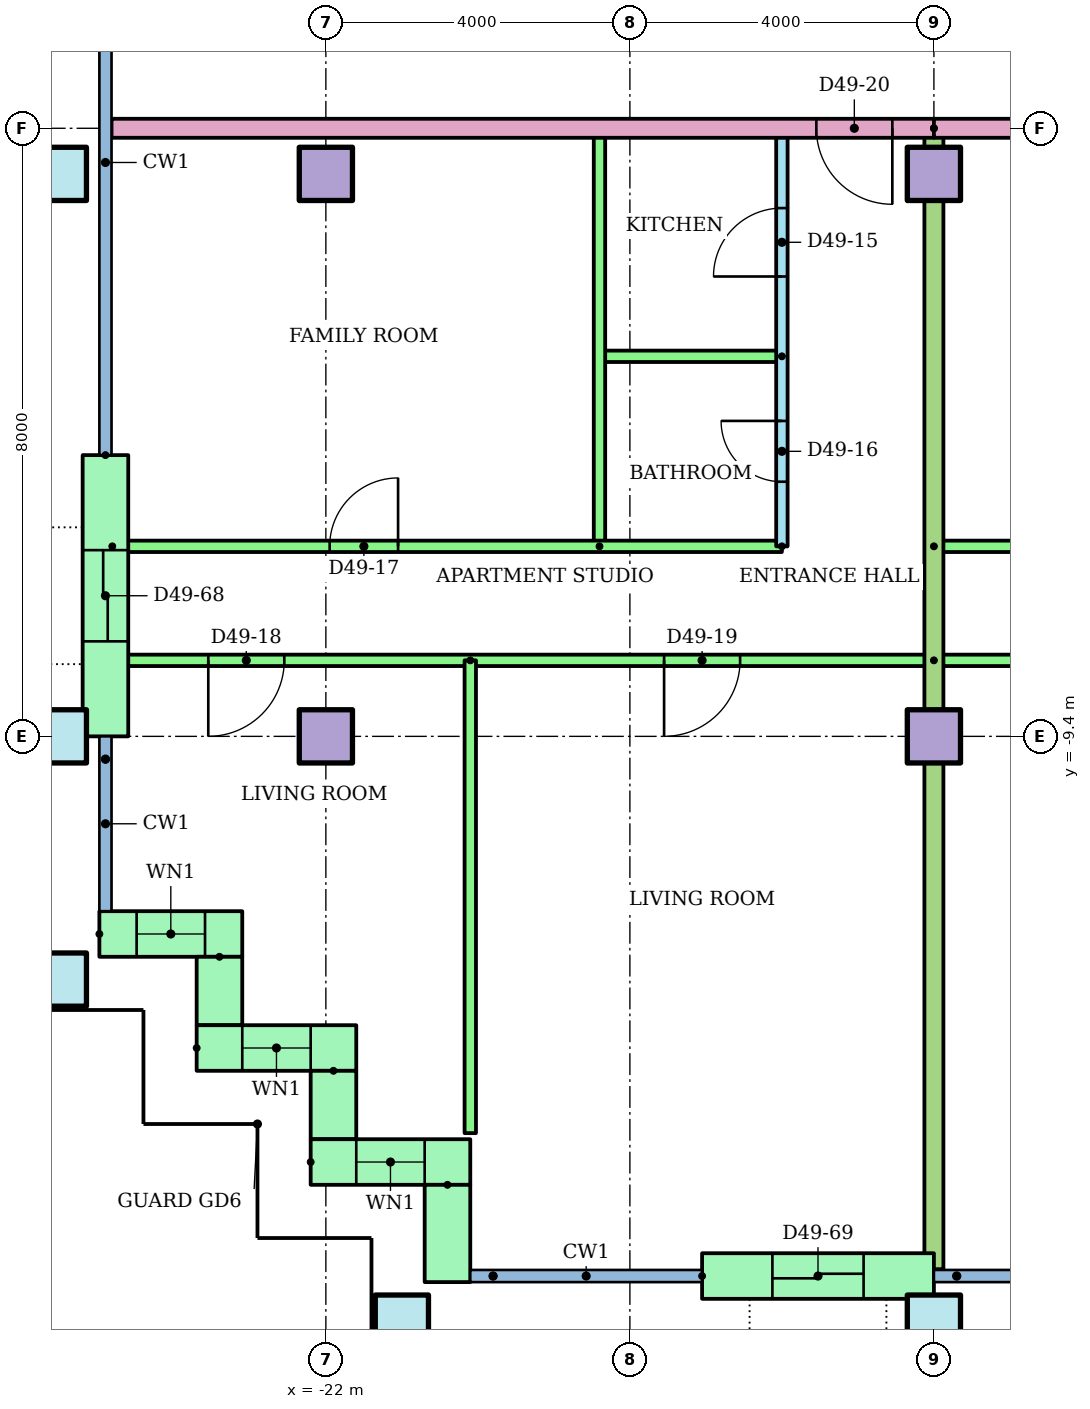
"""IFC4 building model, lengths in metres.
Left out: names, types, materials, properties, quantities, classifications, styles, units other than length and angle.
Written with IfcOpenShell. Run it as: python <this file> out.ifc"""

import sys

from ifc_helpers import new_model, si_unit, direction, frame, frame_2d, origin, origin_2d, place, context, subcontext, project, spatial, rectangle, hollow_rectangle, extrude, element, fill, save


model = new_model("IFC4")
c1 = context("Model", 3, precision=1e-05, world=origin(), true_north=direction((0.0, 1.0)))
c2 = subcontext(c1, "Body", "Model", "MODEL_VIEW")
j1 = project(units=[si_unit("LENGTHUNIT", "METRE"), si_unit("PLANEANGLEUNIT", "RADIAN")], contexts=[c1])
p1 = place(None, origin())
s1 = spatial("IfcSite", under=j1, at=p1, CompositionType="ELEMENT")
p2 = place(p1, origin())
s2 = spatial("IfcBuilding", under=s1, at=p2, CompositionType="ELEMENT")
p3 = place(p2, frame((0.0, 0.0, 187.7)))
s3 = spatial("IfcBuildingStorey", under=s2, at=p3, CompositionType="ELEMENT", Elevation=187.7)
for number, where in (
    (1, (-21.0, -17.1, 0.0)),
    (2, (-14.0, -17.1, 0.0)),
    (3, (-25.5, -12.6, 0.0)),
    (4, (-25.5, -9.4, 0.0)),
):
    element("IfcColumn", number, at=place(p3, frame(where)), inside=s3, PredefinedType="COLUMN", context=c2, shape_type="SweptSolid", body=[
        extrude(hollow_rectangle(XDim=0.7, YDim=0.7, WallThickness=0.036, at=origin_2d()), origin(), (0.0, 0.0, 1.0), 3.2),
    ])
for number, where in (
    (5, (-22.0, -9.4, 0.0)),
    (6, (-14.0, -9.4, 0.0)),
):
    element("IfcColumn", number, at=place(p3, frame(where)), inside=s3, PredefinedType="COLUMN", context=c2, shape_type="SweptSolid", body=[
        extrude(rectangle(XDim=0.7, YDim=0.7, at=origin_2d()), origin(), (0.0, 0.0, 1.0), 3.2),
    ])
p4 = place(p3, frame((-25.5, -2.0, 0.0)))
e7 = element("IfcColumn", 7, at=p4, inside=s3, PredefinedType="COLUMN", context=c2, shape_type="SweptSolid", body=[
    extrude(hollow_rectangle(XDim=0.7, YDim=0.7, WallThickness=0.036, at=origin_2d()), origin(), (0.0, 0.0, 1.0), 3.2),
])
for number, where in (
    (8, (-22.0, -2.0, 0.0)),
    (9, (-14.0, -2.0, 0.0)),
):
    element("IfcColumn", number, at=place(p3, frame(where)), inside=s3, PredefinedType="COLUMN", context=c2, shape_type="SweptSolid", body=[
        extrude(rectangle(XDim=0.7, YDim=0.7, at=origin_2d()), origin(), (0.0, 0.0, 1.0), 3.2),
    ])
p5 = place(p3, frame((-24.9, -5.7, 0.0), z_axis=(0.0, 0.0, 1.0), x_axis=(0.0, -1.0, 0.0)))
e10 = element("IfcWall", 10, at=p5, inside=s3, PredefinedType="STANDARD", context=c2, shape_type="SweptSolid", body=[
    extrude(rectangle(XDim=3.7, YDim=0.6, at=frame_2d((1.85, 0.0))), origin(), (0.0, 0.0, 1.0), 2.92),
])
p6 = place(p5, frame((1.25, 0.0, 0.0)))
e11 = element("IfcOpeningElement", 11, at=p6, cuts=e10, PredefinedType="OPENING", context=c2, shape_type="SweptSolid", body=[
    extrude(rectangle(XDim=1.2, YDim=2.1, at=frame_2d((0.6, 1.05))), frame((0.0, 0.31, 0.0), z_axis=(0.0, -1.0, 0.0), x_axis=(1.0, 0.0, 0.0)), (0.0, 0.0, 1.0), 0.62),
])
p7 = place(p3, frame((-24.98, -12.0, 0.0)))
e12 = element("IfcWall", 12, at=p7, inside=s3, PredefinedType="STANDARD", context=c2, shape_type="SweptSolid", body=[
    extrude(rectangle(XDim=1.88, YDim=0.6, at=frame_2d((0.94, 0.0))), origin(), (0.0, 0.0, 1.0), 2.92),
])
p8 = place(p7, frame((0.49, 0.0, 0.9)))
e13 = element("IfcOpeningElement", 13, at=p8, cuts=e12, PredefinedType="OPENING", context=c2, shape_type="SweptSolid", body=[
    extrude(rectangle(XDim=0.9, YDim=1.5, at=frame_2d((0.45, 0.75))), frame((0.0, 0.31, 0.0), z_axis=(0.0, -1.0, 0.0), x_axis=(1.0, 0.0, 0.0)), (0.0, 0.0, 1.0), 0.62),
])
p9 = place(p3, frame((-23.4, -12.3, 0.0), z_axis=(0.0, 0.0, 1.0), x_axis=(0.0, -1.0, 0.0)))
e14 = element("IfcWall", 14, at=p9, inside=s3, PredefinedType="STANDARD", context=c2, shape_type="SweptSolid", body=[
    extrude(rectangle(XDim=0.9, YDim=0.6, at=frame_2d((0.45, 0.0))), origin(), (0.0, 0.0, 1.0), 2.92),
])
p10 = place(p3, frame((-23.7, -13.5, 0.0)))
e15 = element("IfcWall", 15, at=p10, inside=s3, PredefinedType="STANDARD", context=c2, shape_type="SweptSolid", body=[
    extrude(rectangle(XDim=2.1, YDim=0.6, at=frame_2d((1.05, 0.0))), origin(), (0.0, 0.0, 1.0), 2.92),
])
p11 = place(p10, frame((0.6, 0.0, 0.9)))
e16 = element("IfcOpeningElement", 16, at=p11, cuts=e15, PredefinedType="OPENING", context=c2, shape_type="SweptSolid", body=[
    extrude(rectangle(XDim=0.9, YDim=1.5, at=frame_2d((0.45, 0.75))), frame((0.0, 0.31, 0.0), z_axis=(0.0, -1.0, 0.0), x_axis=(1.0, 0.0, 0.0)), (0.0, 0.0, 1.0), 0.62),
])
p12 = place(p3, frame((-21.9, -13.8, 0.0), z_axis=(0.0, 0.0, 1.0), x_axis=(0.0, -1.0, 0.0)))
e17 = element("IfcWall", 17, at=p12, inside=s3, PredefinedType="STANDARD", context=c2, shape_type="SweptSolid", body=[
    extrude(rectangle(XDim=0.9, YDim=0.6, at=frame_2d((0.45, 0.0))), origin(), (0.0, 0.0, 1.0), 2.92),
])
p13 = place(p3, frame((-22.2, -15.0, 0.0)))
e18 = element("IfcWall", 18, at=p13, inside=s3, PredefinedType="STANDARD", context=c2, shape_type="SweptSolid", body=[
    extrude(rectangle(XDim=2.1, YDim=0.6, at=frame_2d((1.05, 0.0))), origin(), (0.0, 0.0, 1.0), 2.92),
])
p14 = place(p13, frame((0.6, 0.0, 0.9)))
e19 = element("IfcOpeningElement", 19, at=p14, cuts=e18, PredefinedType="OPENING", context=c2, shape_type="SweptSolid", body=[
    extrude(rectangle(XDim=0.9, YDim=1.5, at=frame_2d((0.45, 0.75))), frame((0.0, 0.31, 0.0), z_axis=(0.0, -1.0, 0.0), x_axis=(1.0, 0.0, 0.0)), (0.0, 0.0, 1.0), 0.62),
])
p15 = place(p3, frame((-20.4, -15.3, 0.0), z_axis=(0.0, 0.0, 1.0), x_axis=(0.0, -1.0, 0.0)))
e20 = element("IfcWall", 20, at=p15, inside=s3, PredefinedType="STANDARD", context=c2, shape_type="SweptSolid", body=[
    extrude(rectangle(XDim=1.28, YDim=0.6, at=frame_2d((0.64, 0.0))), origin(), (0.0, 0.0, 1.0), 2.92),
])
p16 = place(p3, frame((-17.05, -16.5, 0.0)))
e21 = element("IfcWall", 21, at=p16, inside=s3, PredefinedType="STANDARD", context=c2, shape_type="SweptSolid", body=[
    extrude(rectangle(XDim=3.05, YDim=0.6, at=frame_2d((1.525, 0.0))), origin(), (0.0, 0.0, 1.0), 2.92),
])
p17 = place(p16, frame((0.925, 0.0, 0.0)))
e22 = element("IfcOpeningElement", 22, at=p17, cuts=e21, PredefinedType="OPENING", context=c2, shape_type="SweptSolid", body=[
    extrude(rectangle(XDim=1.2, YDim=2.1, at=frame_2d((0.6, 1.05))), frame((0.0, 0.31, 0.0), z_axis=(0.0, -1.0, 0.0), x_axis=(1.0, 0.0, 0.0)), (0.0, 0.0, 1.0), 0.62),
])
p18 = place(p3, frame((-16.0, -6.9, 0.0), z_axis=(0.0, 0.0, 1.0), x_axis=(0.0, 1.0, 0.0)))
e23 = element("IfcWall", 23, at=p18, inside=s3, PredefinedType="PARTITIONING", context=c2, shape_type="SweptSolid", body=[
    extrude(rectangle(XDim=5.5, YDim=0.15, at=frame_2d((2.75, 0.0))), origin(), (0.0, 0.0, 1.0), 2.4),
])
p19 = place(p18, frame((3.55, 0.0, 0.0)))
e24 = element("IfcOpeningElement", 24, at=p19, cuts=e23, PredefinedType="OPENING", context=c2, shape_type="SweptSolid", body=[
    extrude(rectangle(XDim=0.9, YDim=2.1, at=frame_2d((0.45, 1.05))), frame((0.0, 0.085, 0.0), z_axis=(0.0, -1.0, 0.0), x_axis=(1.0, 0.0, 0.0)), (0.0, 0.0, 1.0), 0.17),
])
p20 = place(p18, frame((0.85, 0.0, 0.0)))
e25 = element("IfcOpeningElement", 25, at=p20, cuts=e23, PredefinedType="OPENING", context=c2, shape_type="SweptSolid", body=[
    extrude(rectangle(XDim=0.8, YDim=2.1, at=frame_2d((0.4, 1.05))), frame((0.0, 0.085, 0.0), z_axis=(0.0, -1.0, 0.0), x_axis=(1.0, 0.0, 0.0)), (0.0, 0.0, 1.0), 0.17),
])
p21 = place(p3, frame((-16.0, -4.4, 0.0), z_axis=(0.0, 0.0, 1.0), x_axis=(-1.0, 0.0, 0.0)))
e26 = element("IfcWall", 26, at=p21, inside=s3, PredefinedType="PARTITIONING", context=c2, shape_type="SweptSolid", body=[
    extrude(rectangle(XDim=2.4, YDim=0.15, at=frame_2d((1.2, 0.0))), origin(), (0.0, 0.0, 1.0), 2.4),
])
p22 = place(p3, frame((-18.4, -6.9, 0.0), z_axis=(0.0, 0.0, 1.0), x_axis=(0.0, 1.0, 0.0)))
e27 = element("IfcWall", 27, at=p22, inside=s3, PredefinedType="PARTITIONING", context=c2, shape_type="SweptSolid", body=[
    extrude(rectangle(XDim=5.5, YDim=0.15, at=frame_2d((2.75, 0.0))), origin(), (0.0, 0.0, 1.0), 2.4),
])
p23 = place(p3, frame((-24.81, -6.9, 0.0)))
e28 = element("IfcWall", 28, at=p23, inside=s3, PredefinedType="PARTITIONING", context=c2, shape_type="SweptSolid", body=[
    extrude(rectangle(XDim=8.81, YDim=0.15, at=frame_2d((4.405, 0.0))), origin(), (0.0, 0.0, 1.0), 2.4),
])
p24 = place(p23, frame((2.86, 0.0, 0.0)))
e29 = element("IfcOpeningElement", 29, at=p24, cuts=e28, PredefinedType="OPENING", context=c2, shape_type="SweptSolid", body=[
    extrude(rectangle(XDim=0.9, YDim=2.1, at=frame_2d((0.45, 1.05))), frame((0.0, 0.085, 0.0), z_axis=(0.0, -1.0, 0.0), x_axis=(1.0, 0.0, 0.0)), (0.0, 0.0, 1.0), 0.17),
])
p25 = place(p3, frame((-14.0, -8.4, 0.0), z_axis=(0.0, 0.0, 1.0), x_axis=(-1.0, 0.0, 0.0)))
e30 = element("IfcWall", 30, at=p25, inside=s3, PredefinedType="PARTITIONING", context=c2, shape_type="SweptSolid", body=[
    extrude(rectangle(XDim=10.81, YDim=0.15, at=frame_2d((5.405, 0.0))), origin(), (0.0, 0.0, 1.0), 2.4),
])
p26 = place(p25, frame((8.547, 0.0, 0.0)))
e31 = element("IfcOpeningElement", 31, at=p26, cuts=e30, PredefinedType="OPENING", context=c2, shape_type="SweptSolid", body=[
    extrude(rectangle(XDim=1.0, YDim=2.1, at=frame_2d((0.5, 1.05))), frame((0.0, 0.085, 0.0), z_axis=(0.0, -1.0, 0.0), x_axis=(1.0, 0.0, 0.0)), (0.0, 0.0, 1.0), 0.17),
])
p27 = place(p25, frame((2.55, 0.0, 0.0)))
e32 = element("IfcOpeningElement", 32, at=p27, cuts=e30, PredefinedType="OPENING", context=c2, shape_type="SweptSolid", body=[
    extrude(rectangle(XDim=1.0, YDim=2.1, at=frame_2d((0.5, 1.05))), frame((0.0, 0.085, 0.0), z_axis=(0.0, -1.0, 0.0), x_axis=(1.0, 0.0, 0.0)), (0.0, 0.0, 1.0), 0.17),
])
p28 = place(p3, frame((-20.1, -8.4, 0.0), z_axis=(0.0, 0.0, 1.0), x_axis=(0.0, -1.0, 0.0)))
e33 = element("IfcWall", 33, at=p28, inside=s3, PredefinedType="PARTITIONING", context=c2, shape_type="SweptSolid", body=[
    extrude(rectangle(XDim=6.22, YDim=0.15, at=frame_2d((3.11, 0.0))), origin(), (0.0, 0.0, 1.0), 2.4),
])
p29 = place(p3, frame((-14.0, -6.9, 0.0)))
e34 = element("IfcWall", 34, at=p29, inside=s3, PredefinedType="PARTITIONING", context=c2, shape_type="SweptSolid", body=[
    extrude(rectangle(XDim=22.0, YDim=0.15, at=frame_2d((11.0, 0.0))), origin(), (0.0, 0.0, 1.0), 2.4),
])
p30 = place(p29, frame((16.65, 0.0, 0.0)))
e35 = element("IfcOpeningElement", 35, at=p30, cuts=e34, PredefinedType="OPENING", context=c2, shape_type="SweptSolid", body=[
    extrude(rectangle(XDim=0.9, YDim=2.1, at=frame_2d((0.45, 1.05))), frame((0.0, 0.085, 0.0), z_axis=(0.0, -1.0, 0.0), x_axis=(1.0, 0.0, 0.0)), (0.0, 0.0, 1.0), 0.17),
])
p31 = place(p29, frame((10.9, 0.0, 0.0)))
e36 = element("IfcOpeningElement", 36, at=p31, cuts=e34, PredefinedType="OPENING", context=c2, shape_type="SweptSolid", body=[
    extrude(rectangle(XDim=0.9, YDim=2.1, at=frame_2d((0.45, 1.05))), frame((0.0, 0.085, 0.0), z_axis=(0.0, -1.0, 0.0), x_axis=(1.0, 0.0, 0.0)), (0.0, 0.0, 1.0), 0.17),
])
p32 = place(p29, frame((3.6, 0.0, 0.0)))
e37 = element("IfcOpeningElement", 37, at=p32, cuts=e34, PredefinedType="OPENING", context=c2, shape_type="SweptSolid", body=[
    extrude(rectangle(XDim=0.9, YDim=2.1, at=frame_2d((0.45, 1.05))), frame((0.0, 0.085, 0.0), z_axis=(0.0, -1.0, 0.0), x_axis=(1.0, 0.0, 0.0)), (0.0, 0.0, 1.0), 0.17),
])
p33 = place(p3, frame((10.0, -8.4, 0.0), z_axis=(0.0, 0.0, 1.0), x_axis=(-1.0, 0.0, 0.0)))
e38 = element("IfcWall", 38, at=p33, inside=s3, PredefinedType="PARTITIONING", context=c2, shape_type="SweptSolid", body=[
    extrude(rectangle(XDim=24.0, YDim=0.15, at=frame_2d((12.0, 0.0))), origin(), (0.0, 0.0, 1.0), 2.4),
])
p34 = place(p33, frame((19.5, 0.0, 0.0)))
e39 = element("IfcOpeningElement", 39, at=p34, cuts=e38, PredefinedType="OPENING", context=c2, shape_type="SweptSolid", body=[
    extrude(rectangle(XDim=1.0, YDim=2.1, at=frame_2d((0.5, 1.05))), frame((0.0, 0.085, 0.0), z_axis=(0.0, -1.0, 0.0), x_axis=(1.0, 0.0, 0.0)), (0.0, 0.0, 1.0), 0.17),
])
p35 = place(p33, frame((13.55, 0.0, 0.0)))
e40 = element("IfcOpeningElement", 40, at=p35, cuts=e38, PredefinedType="OPENING", context=c2, shape_type="SweptSolid", body=[
    extrude(rectangle(XDim=0.9, YDim=2.1, at=frame_2d((0.45, 1.05))), frame((0.0, 0.085, 0.0), z_axis=(0.0, -1.0, 0.0), x_axis=(1.0, 0.0, 0.0)), (0.0, 0.0, 1.0), 0.17),
])
p36 = place(p33, frame((9.55, 0.0, 0.0)))
e41 = element("IfcOpeningElement", 41, at=p36, cuts=e38, PredefinedType="OPENING", context=c2, shape_type="SweptSolid", body=[
    extrude(rectangle(XDim=0.9, YDim=2.1, at=frame_2d((0.45, 1.05))), frame((0.0, 0.085, 0.0), z_axis=(0.0, -1.0, 0.0), x_axis=(1.0, 0.0, 0.0)), (0.0, 0.0, 1.0), 0.17),
])
p37 = place(p33, frame((5.55, 0.0, 0.0)))
e42 = element("IfcOpeningElement", 42, at=p37, cuts=e38, PredefinedType="OPENING", context=c2, shape_type="SweptSolid", body=[
    extrude(rectangle(XDim=0.9, YDim=2.1, at=frame_2d((0.45, 1.05))), frame((0.0, 0.085, 0.0), z_axis=(0.0, -1.0, 0.0), x_axis=(1.0, 0.0, 0.0)), (0.0, 0.0, 1.0), 0.17),
])
p38 = place(p33, frame((1.55, 0.0, 0.0)))
e43 = element("IfcOpeningElement", 43, at=p38, cuts=e38, PredefinedType="OPENING", context=c2, shape_type="SweptSolid", body=[
    extrude(rectangle(XDim=0.9, YDim=2.1, at=frame_2d((0.45, 1.05))), frame((0.0, 0.085, 0.0), z_axis=(0.0, -1.0, 0.0), x_axis=(1.0, 0.0, 0.0)), (0.0, 0.0, 1.0), 0.17),
])
p39 = place(p3, frame((-14.0, -1.4, 0.0), z_axis=(0.0, 0.0, 1.0), x_axis=(0.0, -1.0, 0.0)))
e44 = element("IfcWall", 44, at=p39, inside=s3, PredefinedType="PARTITIONING", context=c2, shape_type="SweptSolid", body=[
    extrude(rectangle(XDim=15.01, YDim=0.25, at=frame_2d((7.505, 0.0))), origin(), (0.0, 0.0, 1.0), 2.4),
])
p40 = place(p3, frame((-14.0, -1.4, 0.0), z_axis=(0.0, 0.0, 1.0), x_axis=(-1.0, 0.0, 0.0)))
e45 = element("IfcWall", 45, at=p40, inside=s3, PredefinedType="PARTITIONING", context=c2, shape_type="SweptSolid", body=[
    extrude(rectangle(XDim=10.82, YDim=0.25, at=frame_2d((5.41, 0.0))), origin(), (0.0, 0.0, 1.0), 2.4),
])
p41 = place(p40, frame((0.547, 0.0, 0.0)))
e46 = element("IfcOpeningElement", 46, at=p41, cuts=e45, PredefinedType="OPENING", context=c2, shape_type="SweptSolid", body=[
    extrude(rectangle(XDim=1.0, YDim=2.1, at=frame_2d((0.5, 1.05))), frame((0.0, 0.135, 0.0), z_axis=(0.0, -1.0, 0.0), x_axis=(1.0, 0.0, 0.0)), (0.0, 0.0, 1.0), 0.27),
])
p42 = place(p3, frame((14.0, -1.4, 0.0), z_axis=(0.0, 0.0, 1.0), x_axis=(-1.0, 0.0, 0.0)))
e47 = element("IfcWall", 47, at=p42, inside=s3, PredefinedType="PARTITIONING", context=c2, shape_type="SweptSolid", body=[
    extrude(rectangle(XDim=28.0, YDim=0.25, at=frame_2d((14.0, 0.0))), origin(), (0.0, 0.0, 1.0), 2.4),
])
p43 = place(p42, frame((4.547, 0.0, 0.0)))
e48 = element("IfcOpeningElement", 48, at=p43, cuts=e47, PredefinedType="OPENING", context=c2, shape_type="SweptSolid", body=[
    extrude(rectangle(XDim=1.0, YDim=2.1, at=frame_2d((0.5, 1.05))), frame((0.0, 0.135, 0.0), z_axis=(0.0, -1.0, 0.0), x_axis=(1.0, 0.0, 0.0)), (0.0, 0.0, 1.0), 0.27),
])
p44 = place(p42, frame((2.453, 0.0, 0.0)))
e49 = element("IfcOpeningElement", 49, at=p44, cuts=e47, PredefinedType="OPENING", context=c2, shape_type="SweptSolid", body=[
    extrude(rectangle(XDim=1.0, YDim=2.1, at=frame_2d((0.5, 1.05))), frame((0.0, 0.135, 0.0), z_axis=(0.0, -1.0, 0.0), x_axis=(1.0, 0.0, 0.0)), (0.0, 0.0, 1.0), 0.27),
])
p45 = place(p8, origin())
e50 = element("IfcWindow", 50, at=p45, inside=s3, PartitioningType="SINGLE_PANEL", PredefinedType="WINDOW", context=c2, shape_type="SweptSolid", body=[
    extrude(rectangle(XDim=0.9, YDim=1.5, at=frame_2d((0.45, 0.75))), frame((0.0, 0.03, 0.0), z_axis=(0.0, -1.0, 0.0), x_axis=(1.0, 0.0, 0.0)), (0.0, 0.0, 1.0), 0.06),
])
fill(e13, e50)
p46 = place(p11, origin())
e51 = element("IfcWindow", 51, at=p46, inside=s3, PartitioningType="SINGLE_PANEL", PredefinedType="WINDOW", context=c2, shape_type="SweptSolid", body=[
    extrude(rectangle(XDim=0.9, YDim=1.5, at=frame_2d((0.45, 0.75))), frame((0.0, 0.03, 0.0), z_axis=(0.0, -1.0, 0.0), x_axis=(1.0, 0.0, 0.0)), (0.0, 0.0, 1.0), 0.06),
])
fill(e16, e51)
p47 = place(p14, origin())
e52 = element("IfcWindow", 52, at=p47, inside=s3, PartitioningType="SINGLE_PANEL", PredefinedType="WINDOW", context=c2, shape_type="SweptSolid", body=[
    extrude(rectangle(XDim=0.9, YDim=1.5, at=frame_2d((0.45, 0.75))), frame((0.0, 0.03, 0.0), z_axis=(0.0, -1.0, 0.0), x_axis=(1.0, 0.0, 0.0)), (0.0, 0.0, 1.0), 0.06),
])
fill(e19, e52)
p48 = place(p19, origin())
e53 = element("IfcDoor", 53, at=p48, inside=s3, OperationType="SINGLE_SWING_LEFT", PredefinedType="DOOR", context=c2, shape_type="SweptSolid", body=[
    extrude(rectangle(XDim=0.9, YDim=2.1, at=frame_2d((0.45, 1.05))), frame((0.0, 0.025, 0.0), z_axis=(0.0, -1.0, 0.0), x_axis=(1.0, 0.0, 0.0)), (0.0, 0.0, 1.0), 0.05),
])
fill(e24, e53)
p49 = place(p20, origin())
e54 = element("IfcDoor", 54, at=p49, inside=s3, OperationType="SINGLE_SWING_RIGHT", PredefinedType="DOOR", context=c2, shape_type="SweptSolid", body=[
    extrude(rectangle(XDim=0.8, YDim=2.1, at=frame_2d((0.4, 1.05))), frame((0.0, 0.025, 0.0), z_axis=(0.0, -1.0, 0.0), x_axis=(1.0, 0.0, 0.0)), (0.0, 0.0, 1.0), 0.05),
])
fill(e25, e54)
p50 = place(p24, origin())
e55 = element("IfcDoor", 55, at=p50, inside=s3, OperationType="SINGLE_SWING_RIGHT", PredefinedType="DOOR", context=c2, shape_type="SweptSolid", body=[
    extrude(rectangle(XDim=0.9, YDim=2.1, at=frame_2d((0.45, 1.05))), frame((0.0, 0.025, 0.0), z_axis=(0.0, -1.0, 0.0), x_axis=(1.0, 0.0, 0.0)), (0.0, 0.0, 1.0), 0.05),
])
fill(e29, e55)
p51 = place(p26, origin())
e56 = element("IfcDoor", 56, at=p51, inside=s3, OperationType="SINGLE_SWING_RIGHT", PredefinedType="DOOR", context=c2, shape_type="SweptSolid", body=[
    extrude(rectangle(XDim=1.0, YDim=2.1, at=frame_2d((0.5, 1.05))), frame((0.0, 0.025, 0.0), z_axis=(0.0, -1.0, 0.0), x_axis=(1.0, 0.0, 0.0)), (0.0, 0.0, 1.0), 0.05),
])
fill(e31, e56)
p52 = place(p27, origin())
e57 = element("IfcDoor", 57, at=p52, inside=s3, OperationType="SINGLE_SWING_RIGHT", PredefinedType="DOOR", context=c2, shape_type="SweptSolid", body=[
    extrude(rectangle(XDim=1.0, YDim=2.1, at=frame_2d((0.5, 1.05))), frame((0.0, 0.025, 0.0), z_axis=(0.0, -1.0, 0.0), x_axis=(1.0, 0.0, 0.0)), (0.0, 0.0, 1.0), 0.05),
])
fill(e32, e57)
p53 = place(p41, origin())
e58 = element("IfcDoor", 58, at=p53, inside=s3, OperationType="SINGLE_SWING_LEFT", PredefinedType="DOOR", context=c2, shape_type="SweptSolid", body=[
    extrude(rectangle(XDim=1.0, YDim=2.1, at=frame_2d((0.5, 1.05))), frame((0.0, 0.025, 0.0), z_axis=(0.0, -1.0, 0.0), x_axis=(1.0, 0.0, 0.0)), (0.0, 0.0, 1.0), 0.05),
])
fill(e46, e58)
p54 = place(p6, origin())
e59 = element("IfcDoor", 59, at=p54, inside=s3, OperationType="SLIDING_TO_LEFT", PredefinedType="DOOR", context=c2, shape_type="SweptSolid", body=[
    extrude(rectangle(XDim=1.2, YDim=2.1, at=frame_2d((0.6, 1.05))), frame((0.0, 0.025, 0.0), z_axis=(0.0, -1.0, 0.0), x_axis=(1.0, 0.0, 0.0)), (0.0, 0.0, 1.0), 0.05),
])
fill(e11, e59)
p55 = place(p17, origin())
e60 = element("IfcDoor", 60, at=p55, inside=s3, OperationType="SLIDING_TO_LEFT", PredefinedType="DOOR", context=c2, shape_type="SweptSolid", body=[
    extrude(rectangle(XDim=1.2, YDim=2.1, at=frame_2d((0.6, 1.05))), frame((0.0, 0.025, 0.0), z_axis=(0.0, -1.0, 0.0), x_axis=(1.0, 0.0, 0.0)), (0.0, 0.0, 1.0), 0.05),
])
fill(e22, e60)
save(model, sys.argv[1])
